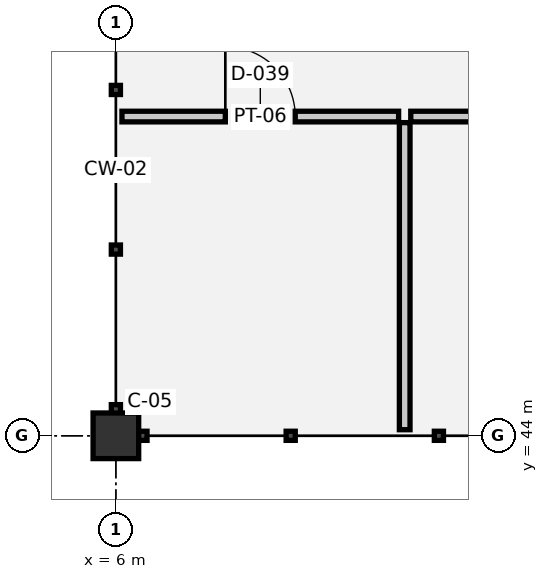
"""IFC4 building model, lengths in metres.
Left out: names, types, materials, properties, quantities, classifications, styles, units other than length and angle.
Written with IfcOpenShell. Run it as: python <this file> out.ifc"""

import sys

from ifc_helpers import new_model, si_unit, direction, frame, frame_2d, origin, origin_2d, place, context, subcontext, project, spatial, rectangle, extrude, element, fill, save


model = new_model("IFC4")
c1 = context("Model", 3, precision=1e-05, world=origin(), true_north=direction((0.0, 1.0)))
c2 = subcontext(c1, "Body", "Model", "MODEL_VIEW")
j1 = project(units=[si_unit("LENGTHUNIT", "METRE"), si_unit("PLANEANGLEUNIT", "RADIAN")], contexts=[c1])
p1 = place(None, origin())
s1 = spatial("IfcSite", under=j1, at=p1, CompositionType="ELEMENT")
p2 = place(p1, origin())
s2 = spatial("IfcBuilding", under=s1, at=p2, CompositionType="ELEMENT")
p3 = place(p2, frame((0.0, 0.0, 14.4)))
s3 = spatial("IfcBuildingStorey", under=s2, at=p3, CompositionType="ELEMENT", Elevation=14.4)
p4 = place(p3, frame((6.0, 44.0, 0.0), z_axis=(0.0, 0.0, 1.0), x_axis=(1.0, 0.0, 0.0)))
e1 = element("IfcColumn", 1, at=p4, inside=s3, PredefinedType="COLUMN", context=c2, shape_type="SweptSolid", body=[
    extrude(rectangle(XDim=0.6, YDim=0.6, at=origin_2d()), origin(), (0.0, 0.0, 1.0), 3.9),
])
p5 = place(p3, frame((6.08, 48.2, 0.0), z_axis=(0.0, 0.0, 1.0), x_axis=(1.0, 0.0, 0.0)))
e2 = element("IfcWall", 2, at=p5, inside=s3, PredefinedType="PLUMBINGWALL", context=c2, shape_type="SweptSolid", body=[
    extrude(rectangle(XDim=3.64, YDim=0.14, at=frame_2d((1.82, 0.0))), origin(), (0.0, 0.0, 1.0), 3.54),
])
p6 = place(p5, frame((1.36, 0.0, 0.0)))
e3 = element("IfcOpeningElement", 3, at=p6, cuts=e2, PredefinedType="OPENING", context=c2, shape_type="SweptSolid", body=[
    extrude(rectangle(XDim=0.92, YDim=2.1, at=frame_2d((0.46, 1.05))), frame((0.0, 0.08, 0.0), z_axis=(0.0, -1.0, 0.0), x_axis=(1.0, 0.0, 0.0)), (0.0, 0.0, 1.0), 0.16),
])
p7 = place(p3, frame((9.88, 48.2, 0.0), z_axis=(0.0, 0.0, 1.0), x_axis=(1.0, 0.0, 0.0)))
e4 = element("IfcWall", 4, at=p7, inside=s3, PredefinedType="PLUMBINGWALL", context=c2, shape_type="SweptSolid", body=[
    extrude(rectangle(XDim=3.22, YDim=0.14, at=frame_2d((1.61, 0.0))), origin(), (0.0, 0.0, 1.0), 3.54),
])
p8 = place(p7, frame((1.13, 0.0, 0.0)))
e5 = element("IfcOpeningElement", 5, at=p8, cuts=e4, PredefinedType="OPENING", context=c2, shape_type="SweptSolid", body=[
    extrude(rectangle(XDim=0.96, YDim=2.1, at=frame_2d((0.48, 1.05))), frame((0.0, 0.08, 0.0), z_axis=(0.0, -1.0, 0.0), x_axis=(1.0, 0.0, 0.0)), (0.0, 0.0, 1.0), 0.16),
])
p9 = place(p3, frame((9.8, 44.08, 0.0), z_axis=(0.0, 0.0, 1.0), x_axis=(0.0, 1.0, 0.0)))
e6 = element("IfcWall", 6, at=p9, inside=s3, PredefinedType="PLUMBINGWALL", context=c2, shape_type="SweptSolid", body=[
    extrude(rectangle(XDim=4.04, YDim=0.14, at=frame_2d((2.02, 0.0))), origin(), (0.0, 0.0, 1.0), 3.54),
])
p10 = place(p6, origin())
e7 = element("IfcDoor", 7, at=p10, inside=s3, OperationType="SINGLE_SWING_LEFT", PredefinedType="DOOR", context=c2, shape_type="SweptSolid", body=[
    extrude(rectangle(XDim=0.92, YDim=2.1, at=frame_2d((0.46, 1.05))), frame((0.0, 0.025, 0.0), z_axis=(0.0, -1.0, 0.0), x_axis=(1.0, 0.0, 0.0)), (0.0, 0.0, 1.0), 0.05),
])
fill(e3, e7)
save(model, sys.argv[1])
